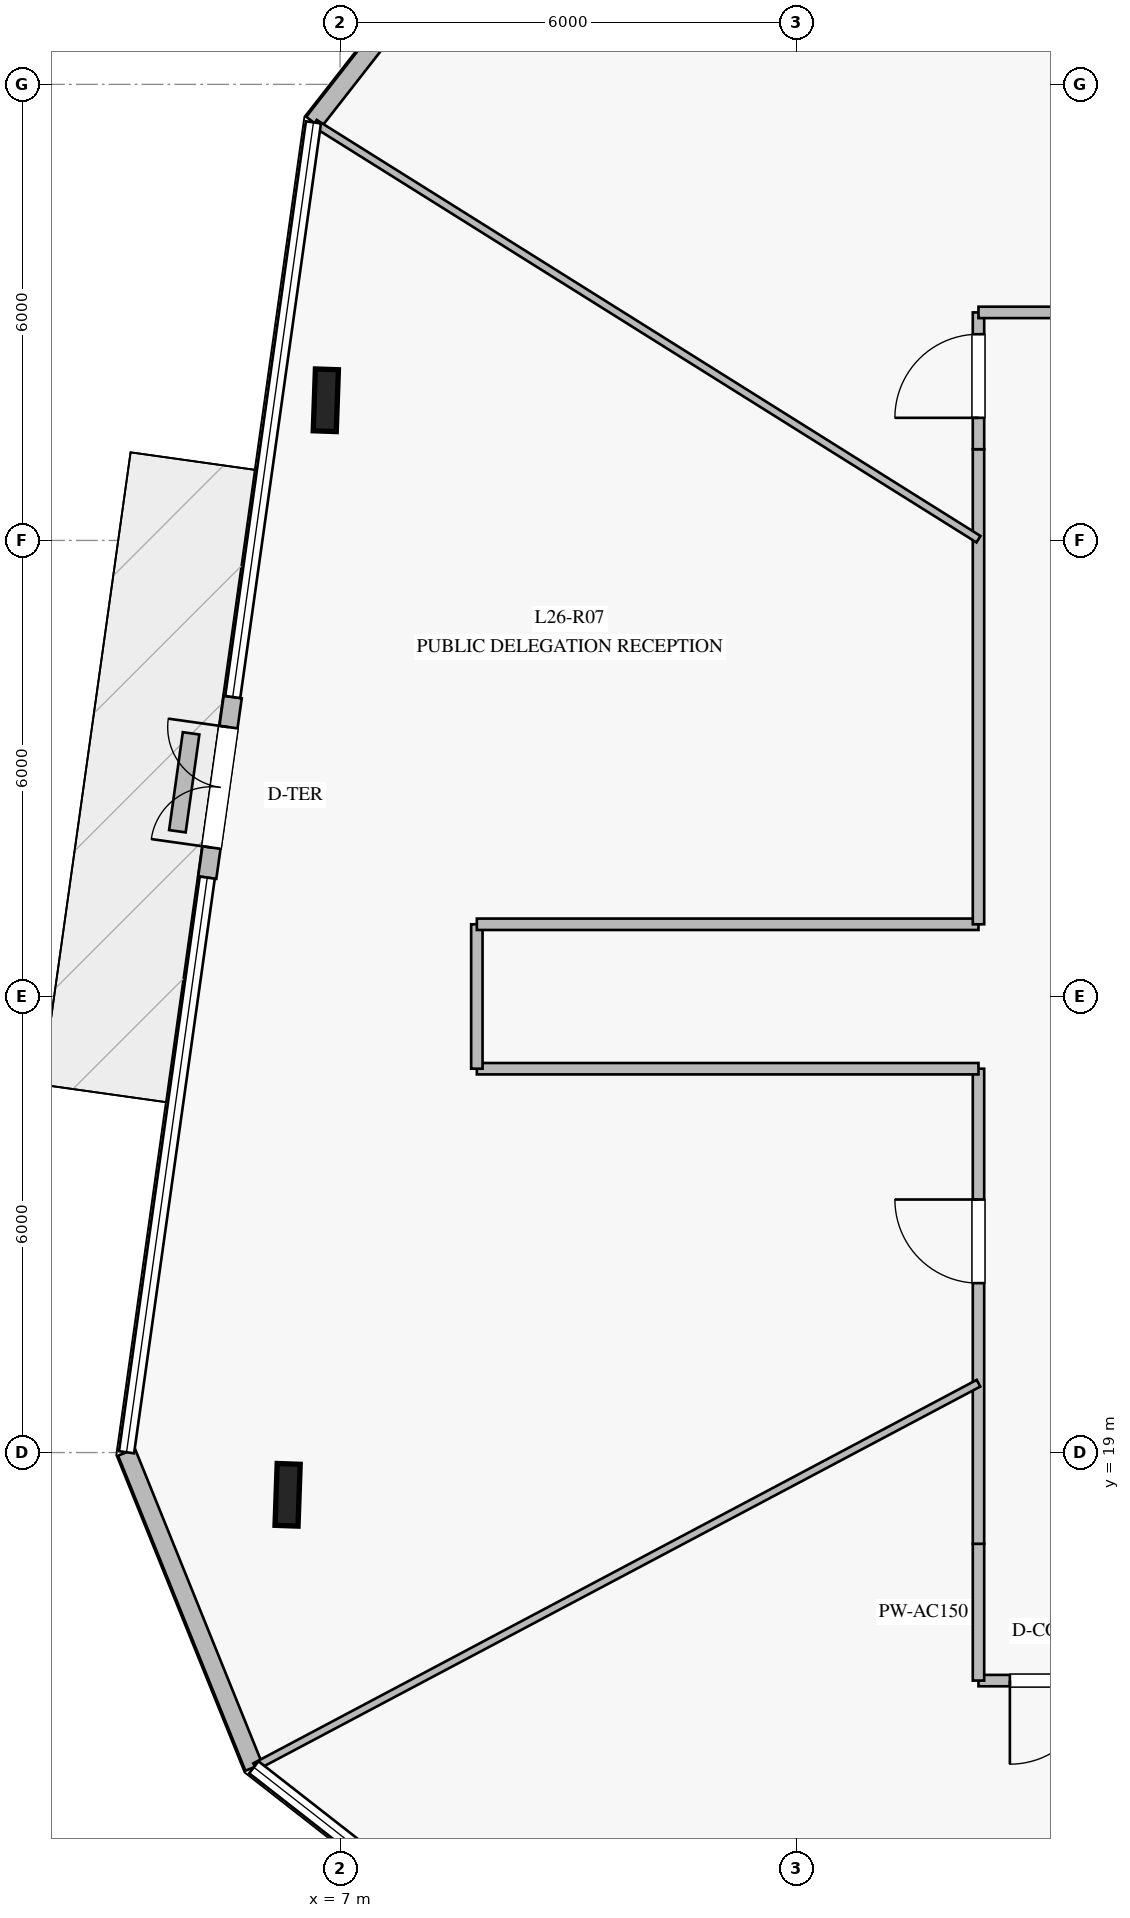
"""IFC4 building model, lengths in metres.
Left out: names, types, materials, properties, quantities, classifications, styles, units other than length and angle.
Written with IfcOpenShell. Run it as: python <this file> out.ifc"""

import sys

from ifc_helpers import new_model, si_unit, direction, frame, frame_2d, origin, origin_2d, place, context, subcontext, project, spatial, rectangle, i_section, extrude, element, fill, save


model = new_model("IFC4")
c1 = context("Model", 3, precision=1e-05, world=origin(), true_north=direction((0.0, 1.0)))
c2 = subcontext(c1, "Body", "Model", "MODEL_VIEW")
j1 = project(units=[si_unit("LENGTHUNIT", "METRE"), si_unit("PLANEANGLEUNIT", "RADIAN")], contexts=[c1])
p1 = place(None, origin())
s1 = spatial("IfcSite", under=j1, at=p1, CompositionType="ELEMENT")
p2 = place(p1, origin())
s2 = spatial("IfcBuilding", under=s1, at=p2, CompositionType="ELEMENT")
p3 = place(p2, frame((0.0, 0.0, 110.4)))
s3 = spatial("IfcBuildingStorey", under=s2, at=p3, CompositionType="ELEMENT", Elevation=110.4)
for number, where, z_axis, x_axis in (
    (1, (6.813, 32.844, 0.0), (0.0, 0.0, 1.0), (0.035, 0.999, 0.0)),
    (2, (6.31, 18.444, 0.0), (0.0, 0.0, 1.0), (0.035, 0.999, 0.0)),
):
    element("IfcColumn", number, at=place(p3, frame(where, z_axis=z_axis, x_axis=x_axis)), inside=s3, PredefinedType="COLUMN", context=c2, shape_type="SweptSolid", body=[
        extrude(i_section(OverallWidth=0.303, OverallDepth=0.814, WebThickness=0.021, FlangeThickness=0.04, at=origin_2d()), origin(), (0.0, 0.0, 1.0), 4.0),
    ])
p4 = place(p3, frame((9.403, 40.023, 0.0), z_axis=(0.0, 0.0, 1.0), x_axis=(-0.615764831552, -0.787929991956, 0.0)))
e3 = element("IfcWall", 3, at=p4, inside=s3, PredefinedType="STANDARD", context=c2, shape_type="SweptSolid", body=[
    extrude(rectangle(XDim=4.471, YDim=0.24, at=frame_2d((2.236, 0.0))), origin(), (0.0, 0.0, 1.0), 3.76),
])
p5 = place(p3, frame((5.588, 28.94, 0.0), z_axis=(0.0, 0.0, 1.0), x_axis=(-0.139597798182, -0.990208288565, 0.0)))
e4 = element("IfcWall", 4, at=p5, inside=s3, PredefinedType="STANDARD", context=c2, shape_type="SweptSolid", body=[
    extrude(rectangle(XDim=2.399, YDim=0.24, at=frame_2d((1.2, 0.0))), origin(), (0.0, 0.0, 1.0), 3.76),
])
p6 = place(p5, frame((0.4, 0.0, 0.0)))
e5 = element("IfcOpeningElement", 5, at=p6, cuts=e4, PredefinedType="OPENING", context=c2, shape_type="SweptSolid", body=[
    extrude(rectangle(XDim=1.6, YDim=2.25, at=frame_2d((0.8, 1.125))), frame((0.0, 0.13, 0.0), z_axis=(0.0, -1.0, 0.0), x_axis=(1.0, 0.0, 0.0)), (0.0, 0.0, 1.0), 0.26),
])
p7 = place(p3, frame((4.191, 19.004, 0.0), z_axis=(0.0, 0.0, 1.0), x_axis=(0.374674323127, -0.927156487109, 0.0)))
e6 = element("IfcWall", 6, at=p7, inside=s3, PredefinedType="STANDARD", context=c2, shape_type="SweptSolid", body=[
    extrude(rectangle(XDim=4.471, YDim=0.24, at=frame_2d((2.235, 0.0))), origin(), (0.0, 0.0, 1.0), 3.76),
])
p8 = place(p3, frame((5.04, 28.462, 0.0), z_axis=(0.0, 0.0, 1.0), x_axis=(-0.138371628126, -0.990380377698, 0.0)))
e7 = element("IfcWall", 7, at=p8, inside=s3, PredefinedType="USERDEFINED", context=c2, shape_type="SweptSolid", body=[
    extrude(rectangle(XDim=1.3, YDim=0.22, at=frame_2d((0.65, 0.0))), origin(), (0.0, 0.0, 1.0), 0.4),
])
p9 = place(p3, frame((17.2, 16.0, 0.0), z_axis=(0.0, 0.0, 1.0), x_axis=(-1.0, 0.0, 0.0)))
e8 = element("IfcWall", 8, at=p9, inside=s3, PredefinedType="PARTITIONING", context=c2, shape_type="SweptSolid", body=[
    extrude(rectangle(XDim=1.8, YDim=0.15, at=frame_2d((0.9, 0.0))), origin(), (0.0, 0.0, 1.0), 3.36),
])
p10 = place(p9, frame((0.287, 0.0, 0.0)))
e9 = element("IfcOpeningElement", 9, at=p10, cuts=e8, PredefinedType="OPENING", context=c2, shape_type="SweptSolid", body=[
    extrude(rectangle(XDim=1.1, YDim=2.2, at=frame_2d((0.55, 1.1))), frame((0.0, 0.085, 0.0), z_axis=(0.0, -1.0, 0.0), x_axis=(1.0, 0.0, 0.0)), (0.0, 0.0, 1.0), 0.17),
])
p11 = place(p3, frame((15.4, 16.0, 0.0), z_axis=(0.0, 0.0, 1.0), x_axis=(0.0, 1.0, 0.0)))
e10 = element("IfcWall", 10, at=p11, inside=s3, PredefinedType="PARTITIONING", context=c2, shape_type="SweptSolid", body=[
    extrude(rectangle(XDim=1.8, YDim=0.15, at=frame_2d((0.9, 0.0))), origin(), (0.0, 0.0, 1.0), 3.21),
])
p12 = place(p3, frame((15.4, 17.8, 0.0), z_axis=(0.0, 0.0, 1.0), x_axis=(0.0, 1.0, 0.0)))
e11 = element("IfcWall", 11, at=p12, inside=s3, PredefinedType="PARTITIONING", context=c2, shape_type="SweptSolid", body=[
    extrude(rectangle(XDim=6.25, YDim=0.15, at=frame_2d((3.125, 0.0))), origin(), (0.0, 0.0, 1.0), 3.21),
])
p13 = place(p12, frame((3.429, 0.0, 0.0)))
e12 = element("IfcOpeningElement", 12, at=p13, cuts=e11, PredefinedType="OPENING", context=c2, shape_type="SweptSolid", body=[
    extrude(rectangle(XDim=1.1, YDim=2.2, at=frame_2d((0.55, 1.1))), frame((0.0, 0.085, 0.0), z_axis=(0.0, -1.0, 0.0), x_axis=(1.0, 0.0, 0.0)), (0.0, 0.0, 1.0), 0.17),
])
p14 = place(p3, frame((15.4, 24.05, 0.0), z_axis=(0.0, 0.0, 1.0), x_axis=(-1.0, 0.0, 0.0)))
e13 = element("IfcWall", 13, at=p14, inside=s3, PredefinedType="PARTITIONING", context=c2, shape_type="SweptSolid", body=[
    extrude(rectangle(XDim=6.6, YDim=0.15, at=frame_2d((3.3, 0.0))), origin(), (0.0, 0.0, 1.0), 3.05),
])
p15 = place(p3, frame((8.8, 24.05, 0.0), z_axis=(0.0, 0.0, 1.0), x_axis=(0.0, 1.0, 0.0)))
e14 = element("IfcWall", 14, at=p15, inside=s3, PredefinedType="PARTITIONING", context=c2, shape_type="SweptSolid", body=[
    extrude(rectangle(XDim=1.9, YDim=0.15, at=frame_2d((0.95, 0.0))), origin(), (0.0, 0.0, 1.0), 3.3),
])
p16 = place(p3, frame((8.8, 25.95, 0.0), z_axis=(0.0, 0.0, 1.0), x_axis=(1.0, 0.0, 0.0)))
e15 = element("IfcWall", 15, at=p16, inside=s3, PredefinedType="PARTITIONING", context=c2, shape_type="SweptSolid", body=[
    extrude(rectangle(XDim=6.6, YDim=0.15, at=frame_2d((3.3, 0.0))), origin(), (0.0, 0.0, 1.0), 3.05),
])
p17 = place(p3, frame((15.4, 25.95, 0.0), z_axis=(0.0, 0.0, 1.0), x_axis=(0.0, 1.0, 0.0)))
e16 = element("IfcWall", 16, at=p17, inside=s3, PredefinedType="PARTITIONING", context=c2, shape_type="SweptSolid", body=[
    extrude(rectangle(XDim=6.25, YDim=0.15, at=frame_2d((3.125, 0.0))), origin(), (0.0, 0.0, 1.0), 3.21),
])
p18 = place(p3, frame((15.4, 32.2, 0.0), z_axis=(0.0, 0.0, 1.0), x_axis=(0.0, 1.0, 0.0)))
e17 = element("IfcWall", 17, at=p18, inside=s3, PredefinedType="PARTITIONING", context=c2, shape_type="SweptSolid", body=[
    extrude(rectangle(XDim=1.8, YDim=0.15, at=frame_2d((0.9, 0.0))), origin(), (0.0, 0.0, 1.0), 3.21),
])
p19 = place(p18, frame((0.413, 0.0, 0.0)))
e18 = element("IfcOpeningElement", 18, at=p19, cuts=e17, PredefinedType="OPENING", context=c2, shape_type="SweptSolid", body=[
    extrude(rectangle(XDim=1.1, YDim=2.2, at=frame_2d((0.55, 1.1))), frame((0.0, 0.085, 0.0), z_axis=(0.0, -1.0, 0.0), x_axis=(1.0, 0.0, 0.0)), (0.0, 0.0, 1.0), 0.17),
])
p20 = place(p3, frame((15.4, 34.0, 0.0), z_axis=(0.0, 0.0, 1.0), x_axis=(1.0, 0.0, 0.0)))
e19 = element("IfcWall", 19, at=p20, inside=s3, PredefinedType="PARTITIONING", context=c2, shape_type="SweptSolid", body=[
    extrude(rectangle(XDim=1.8, YDim=0.15, at=frame_2d((0.9, 0.0))), origin(), (0.0, 0.0, 1.0), 3.76),
])
p21 = place(p3, frame((15.4, 31.016, 0.0), z_axis=(0.0, 0.0, 1.0), x_axis=(-0.847334971685, 0.531058796896, 0.0)))
e20 = element("IfcWall", 20, at=p21, inside=s3, PredefinedType="MOVABLE", context=c2, shape_type="SweptSolid", body=[
    extrude(rectangle(XDim=10.307, YDim=0.1, at=frame_2d((5.154, 0.0))), origin(), (0.0, 0.0, 1.0), 3.16),
])
p22 = place(p3, frame((15.4, 19.912, 0.0), z_axis=(0.0, 0.0, 1.0), x_axis=(-0.883545234496, -0.468345832265, 0.0)))
e21 = element("IfcWall", 21, at=p22, inside=s3, PredefinedType="MOVABLE", context=c2, shape_type="SweptSolid", body=[
    extrude(rectangle(XDim=10.772, YDim=0.1, at=frame_2d((5.386, 0.0))), origin(), (0.0, 0.0, 1.0), 3.16),
])
p23 = place(p6, frame((1.6, 0.0, 0.0), z_axis=(0.0, 0.0, 1.0), x_axis=(-1.0, 0.0, 0.0)))
e22 = element("IfcDoor", 22, at=p23, inside=s3, OperationType="DOUBLE_DOOR_SINGLE_SWING", PredefinedType="DOOR", context=c2, shape_type="SweptSolid", body=[
    extrude(rectangle(XDim=1.6, YDim=2.25, at=frame_2d((0.8, 1.125))), frame((0.0, 0.025, 0.0), z_axis=(0.0, -1.0, 0.0), x_axis=(1.0, 0.0, 0.0)), (0.0, 0.0, 1.0), 0.05),
])
fill(e5, e22)
p24 = place(p10, origin())
e23 = element("IfcDoor", 23, at=p24, inside=s3, OperationType="SINGLE_SWING_RIGHT", PredefinedType="DOOR", context=c2, shape_type="SweptSolid", body=[
    extrude(rectangle(XDim=1.1, YDim=2.2, at=frame_2d((0.55, 1.1))), frame((0.0, 0.025, 0.0), z_axis=(0.0, -1.0, 0.0), x_axis=(1.0, 0.0, 0.0)), (0.0, 0.0, 1.0), 0.05),
])
fill(e9, e23)
p25 = place(p19, origin())
e24 = element("IfcDoor", 24, at=p25, inside=s3, OperationType="SINGLE_SWING_LEFT", PredefinedType="DOOR", context=c2, shape_type="SweptSolid", body=[
    extrude(rectangle(XDim=1.1, YDim=2.2, at=frame_2d((0.55, 1.1))), frame((0.0, 0.025, 0.0), z_axis=(0.0, -1.0, 0.0), x_axis=(1.0, 0.0, 0.0)), (0.0, 0.0, 1.0), 0.05),
])
fill(e18, e24)
p26 = place(p13, origin())
e25 = element("IfcDoor", 25, at=p26, inside=s3, OperationType="SINGLE_SWING_RIGHT", PredefinedType="DOOR", context=c2, shape_type="SweptSolid", body=[
    extrude(rectangle(XDim=1.1, YDim=2.2, at=frame_2d((0.55, 1.1))), frame((0.0, 0.025, 0.0), z_axis=(0.0, -1.0, 0.0), x_axis=(1.0, 0.0, 0.0)), (0.0, 0.0, 1.0), 0.05),
])
fill(e12, e25)
save(model, sys.argv[1])
